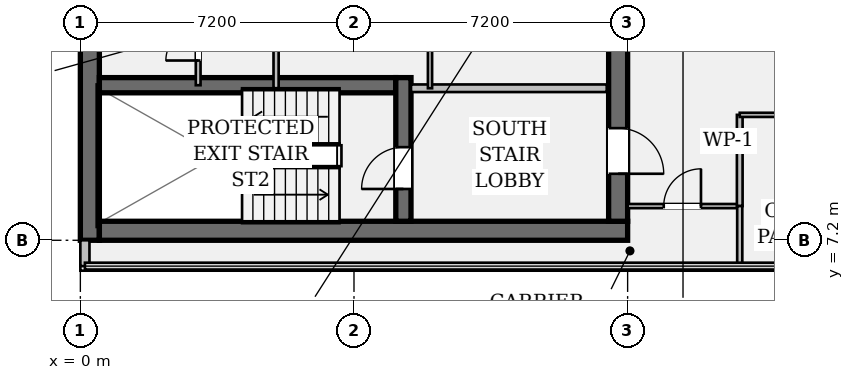
"""IFC4 building model, lengths in metres.
Left out: names, types, materials, properties, quantities, classifications, styles, units other than length and angle.
Written with IfcOpenShell. Run it as: python <this file> out.ifc"""

import sys

from ifc_helpers import new_model, si_unit, direction, frame, frame_2d, origin, place, context, subcontext, project, spatial, rectangle, extrude, element, fill, save


model = new_model("IFC4")
c1 = context("Model", 3, precision=1e-05, world=origin(), true_north=direction((0.0, 1.0)))
c2 = subcontext(c1, "Body", "Model", "MODEL_VIEW")
j1 = project(units=[si_unit("LENGTHUNIT", "METRE"), si_unit("PLANEANGLEUNIT", "RADIAN")], contexts=[c1])
p1 = place(None, origin())
s1 = spatial("IfcSite", under=j1, at=p1, CompositionType="ELEMENT")
p2 = place(p1, origin())
s2 = spatial("IfcBuilding", under=s1, at=p2, CompositionType="ELEMENT")
p3 = place(p2, frame((0.0, 0.0, 290.15)))
s3 = spatial("IfcBuildingStorey", under=s2, at=p3, CompositionType="ELEMENT", Elevation=290.15)
p4 = place(p3, frame((0.25, 7.2, 0.0), z_axis=(0.0, 0.0, 1.0), x_axis=(0.0, 1.0, 0.0)))
e1 = element("IfcWall", 1, at=p4, inside=s3, PredefinedType="SHEAR", context=c2, shape_type="SweptSolid", body=[
    extrude(rectangle(XDim=28.8, YDim=0.5, at=frame_2d((14.4, 0.0))), origin(), (0.0, 0.0, 1.0), 3.24),
])
p5 = place(p3, frame((0.5, 7.45, 0.0), z_axis=(0.0, 0.0, 1.0), x_axis=(1.0, 0.0, 0.0)))
e2 = element("IfcWall", 2, at=p5, inside=s3, PredefinedType="SHEAR", context=c2, shape_type="SweptSolid", body=[
    extrude(rectangle(XDim=13.9, YDim=0.5, at=frame_2d((6.95, 0.0))), origin(), (0.0, 0.0, 1.0), 3.24),
])
p6 = place(p3, frame((14.15, 35.5, 0.0), z_axis=(0.0, 0.0, 1.0), x_axis=(0.0, -1.0, 0.0)))
e3 = element("IfcWall", 3, at=p6, inside=s3, PredefinedType="SHEAR", context=c2, shape_type="SweptSolid", body=[
    extrude(rectangle(XDim=27.8, YDim=0.5, at=frame_2d((13.9, 0.0))), origin(), (0.0, 0.0, 1.0), 3.24),
])
p7 = place(p6, frame((1.4, 0.0, 0.0)))
e4 = element("IfcOpeningElement", 4, at=p7, cuts=e3, PredefinedType="OPENING", context=c2, shape_type="SweptSolid", body=[
    extrude(rectangle(XDim=1.2, YDim=2.15, at=frame_2d((0.6, 1.075))), frame((0.0, 0.262, 0.0), z_axis=(0.0, -1.0, 0.0), x_axis=(1.0, 0.0, 0.0)), (0.0, 0.0, 1.0), 0.524),
])
p8 = place(p6, frame((25.35, 0.0, 0.0)))
e5 = element("IfcOpeningElement", 5, at=p8, cuts=e3, PredefinedType="OPENING", context=c2, shape_type="SweptSolid", body=[
    extrude(rectangle(XDim=1.2, YDim=2.15, at=frame_2d((0.6, 1.075))), frame((0.0, 0.262, 0.0), z_axis=(0.0, -1.0, 0.0), x_axis=(1.0, 0.0, 0.0)), (0.0, 0.0, 1.0), 0.524),
])
p9 = place(p6, frame((14.7, 0.0, 0.0)))
e6 = element("IfcOpeningElement", 6, at=p9, cuts=e3, PredefinedType="OPENING", context=c2, shape_type="SweptSolid", body=[
    extrude(rectangle(XDim=1.6, YDim=2.2, at=frame_2d((0.8, 1.1))), frame((0.0, 0.262, 0.0), z_axis=(0.0, -1.0, 0.0), x_axis=(1.0, 0.0, 0.0)), (0.0, 0.0, 1.0), 0.524),
])
p10 = place(p3, frame((0.5, 11.28, 0.0), z_axis=(0.0, 0.0, 1.0), x_axis=(1.0, 0.0, 0.0)))
e7 = element("IfcWall", 7, at=p10, inside=s3, PredefinedType="SHEAR", context=c2, shape_type="SweptSolid", body=[
    extrude(rectangle(XDim=7.8, YDim=0.4, at=frame_2d((3.9, 0.0))), origin(), (0.0, 0.0, 1.0), 3.24),
])
p11 = place(p3, frame((8.5, 7.7, 0.0), z_axis=(0.0, 0.0, 1.0), x_axis=(0.0, 1.0, 0.0)))
e8 = element("IfcWall", 8, at=p11, inside=s3, PredefinedType="SHEAR", context=c2, shape_type="SweptSolid", body=[
    extrude(rectangle(XDim=3.78, YDim=0.4, at=frame_2d((1.89, 0.0))), origin(), (0.0, 0.0, 1.0), 3.24),
])
p12 = place(p11, frame((0.85, 0.0, 0.0)))
e9 = element("IfcOpeningElement", 9, at=p12, cuts=e8, PredefinedType="OPENING", context=c2, shape_type="SweptSolid", body=[
    extrude(rectangle(XDim=1.1, YDim=2.15, at=frame_2d((0.55, 1.075))), frame((0.0, 0.212, 0.0), z_axis=(0.0, -1.0, 0.0), x_axis=(1.0, 0.0, 0.0)), (0.0, 0.0, 1.0), 0.424),
])
p13 = place(p3, frame((0.12, 6.52, 0.0), z_axis=(0.0, 0.0, 1.0), x_axis=(0.0, 1.0, 0.0)))
e10 = element("IfcWall", 10, at=p13, inside=s3, PredefinedType="STANDARD", context=c2, shape_type="SweptSolid", body=[
    extrude(rectangle(XDim=0.68, YDim=0.24, at=frame_2d((0.34, 0.0))), origin(), (0.0, 0.0, 1.0), 3.24),
])
p14 = place(p3, frame((8.7, 11.2, 0.0), z_axis=(0.0, 0.0, 1.0), x_axis=(1.0, 0.0, 0.0)))
e11 = element("IfcWall", 11, at=p14, inside=s3, PredefinedType="PARTITIONING", context=c2, shape_type="SweptSolid", body=[
    extrude(rectangle(XDim=5.15, YDim=0.2, at=frame_2d((2.575, 0.0))), origin(), (0.0, 0.0, 1.0), 3.24),
])
p15 = place(p3, frame((5.15, 11.2, 0.0), z_axis=(0.0, 0.0, 1.0), x_axis=(0.0, 1.0, 0.0)))
e12 = element("IfcWall", 12, at=p15, inside=s3, PredefinedType="PARTITIONING", context=c2, shape_type="SweptSolid", body=[
    extrude(rectangle(XDim=6.6, YDim=0.135, at=frame_2d((3.3, 0.0))), origin(), (0.0, 0.0, 1.0), 3.24),
])
p16 = place(p3, frame((9.2, 11.2, 0.0), z_axis=(0.0, 0.0, 1.0), x_axis=(0.0, 1.0, 0.0)))
e13 = element("IfcWall", 13, at=p16, inside=s3, PredefinedType="PARTITIONING", context=c2, shape_type="SweptSolid", body=[
    extrude(rectangle(XDim=6.6, YDim=0.11, at=frame_2d((3.3, 0.0))), origin(), (0.0, 0.0, 1.0), 3.24),
])
p17 = place(p3, frame((3.1, 11.28, 0.0), z_axis=(0.0, 0.0, 1.0), x_axis=(0.0, 1.0, 0.0)))
e14 = element("IfcWall", 14, at=p17, inside=s3, PredefinedType="PARTITIONING", context=c2, shape_type="SweptSolid", body=[
    extrude(rectangle(XDim=4.42, YDim=0.125, at=frame_2d((2.21, 0.0))), origin(), (0.0, 0.0, 1.0), 3.24),
])
p18 = place(p17, frame((0.65, 0.0, 0.0)))
e15 = element("IfcOpeningElement", 15, at=p18, cuts=e14, PredefinedType="OPENING", context=c2, shape_type="SweptSolid", body=[
    extrude(rectangle(XDim=0.85, YDim=2.15, at=frame_2d((0.425, 1.075))), frame((0.0, 0.074, 0.0), z_axis=(0.0, -1.0, 0.0), x_axis=(1.0, 0.0, 0.0)), (0.0, 0.0, 1.0), 0.149),
])
p19 = place(p17, frame((2.75, 0.0, 0.0)))
e16 = element("IfcOpeningElement", 16, at=p19, cuts=e14, PredefinedType="OPENING", context=c2, shape_type="SweptSolid", body=[
    extrude(rectangle(XDim=0.85, YDim=2.15, at=frame_2d((0.425, 1.075))), frame((0.0, 0.074, 0.0), z_axis=(0.0, -1.0, 0.0), x_axis=(1.0, 0.0, 0.0)), (0.0, 0.0, 1.0), 0.149),
])
p20 = place(p3, frame((14.4, 8.1, 0.0), z_axis=(0.0, 0.0, 1.0), x_axis=(1.0, 0.0, 0.0)))
e17 = element("IfcWall", 17, at=p20, inside=s3, PredefinedType="PARTITIONING", context=c2, shape_type="SweptSolid", body=[
    extrude(rectangle(XDim=2.95, YDim=0.11, at=frame_2d((1.475, 0.0))), origin(), (0.0, 0.0, 1.0), 3.24),
])
p21 = place(p20, frame((0.95, 0.0, 0.0)))
e18 = element("IfcOpeningElement", 18, at=p21, cuts=e17, PredefinedType="OPENING", context=c2, shape_type="SweptSolid", body=[
    extrude(rectangle(XDim=0.98, YDim=2.15, at=frame_2d((0.49, 1.075))), frame((0.0, 0.067, 0.0), z_axis=(0.0, -1.0, 0.0), x_axis=(1.0, 0.0, 0.0)), (0.0, 0.0, 1.0), 0.134),
])
p22 = place(p3, frame((17.35, 8.1, 0.0), z_axis=(0.0, 0.0, 1.0), x_axis=(0.0, 1.0, 0.0)))
e19 = element("IfcWall", 19, at=p22, inside=s3, PredefinedType="PARTITIONING", context=c2, shape_type="SweptSolid", body=[
    extrude(rectangle(XDim=2.4, YDim=0.15, at=frame_2d((1.2, 0.0))), origin(), (0.0, 0.0, 1.0), 3.24),
])
p23 = place(p3, frame((17.35, 10.5, 0.0), z_axis=(0.0, 0.0, 1.0), x_axis=(1.0, 0.0, 0.0)))
e20 = element("IfcWall", 20, at=p23, inside=s3, PredefinedType="PARTITIONING", context=c2, shape_type="SweptSolid", body=[
    extrude(rectangle(XDim=12.6, YDim=0.11, at=frame_2d((6.3, 0.0))), origin(), (0.0, 0.0, 1.0), 2.676),
])
p24 = place(p23, frame((1.92, 0.0, 0.0)))
e21 = element("IfcOpeningElement", 21, at=p24, cuts=e20, PredefinedType="OPENING", context=c2, shape_type="SweptSolid", body=[
    extrude(rectangle(XDim=0.98, YDim=2.15, at=frame_2d((0.49, 1.075))), frame((0.0, 0.067, 0.0), z_axis=(0.0, -1.0, 0.0), x_axis=(1.0, 0.0, 0.0)), (0.0, 0.0, 1.0), 0.134),
])
p25 = place(p23, frame((6.55, 0.0, 0.0)))
e22 = element("IfcOpeningElement", 22, at=p25, cuts=e20, PredefinedType="OPENING", context=c2, shape_type="SweptSolid", body=[
    extrude(rectangle(XDim=0.98, YDim=2.15, at=frame_2d((0.49, 1.075))), frame((0.0, 0.067, 0.0), z_axis=(0.0, -1.0, 0.0), x_axis=(1.0, 0.0, 0.0)), (0.0, 0.0, 1.0), 0.134),
])
p26 = place(p23, frame((10.42, 0.0, 0.0)))
e23 = element("IfcOpeningElement", 23, at=p26, cuts=e20, PredefinedType="OPENING", context=c2, shape_type="SweptSolid", body=[
    extrude(rectangle(XDim=0.98, YDim=2.15, at=frame_2d((0.49, 1.075))), frame((0.0, 0.067, 0.0), z_axis=(0.0, -1.0, 0.0), x_axis=(1.0, 0.0, 0.0)), (0.0, 0.0, 1.0), 0.134),
])
p27 = place(p3, frame((17.35, 6.52, 0.0), z_axis=(0.0, 0.0, 1.0), x_axis=(0.0, 1.0, 0.0)))
e24 = element("IfcWall", 24, at=p27, inside=s3, PredefinedType="PARTITIONING", context=c2, shape_type="SweptSolid", body=[
    extrude(rectangle(XDim=1.58, YDim=0.135, at=frame_2d((0.79, 0.0))), origin(), (0.0, 0.0, 1.0), 3.24),
])
p28 = place(p12, origin())
e25 = element("IfcDoor", 25, at=p28, inside=s3, OperationType="SINGLE_SWING_LEFT", PredefinedType="DOOR", context=c2, shape_type="SweptSolid", body=[
    extrude(rectangle(XDim=1.1, YDim=2.15, at=frame_2d((0.55, 1.075))), frame((0.0, 0.025, 0.0), z_axis=(0.0, -1.0, 0.0), x_axis=(1.0, 0.0, 0.0)), (0.0, 0.0, 1.0), 0.05),
])
fill(e9, e25)
p29 = place(p8, origin())
e26 = element("IfcDoor", 26, at=p29, inside=s3, OperationType="SINGLE_SWING_RIGHT", PredefinedType="DOOR", context=c2, shape_type="SweptSolid", body=[
    extrude(rectangle(XDim=1.2, YDim=2.15, at=frame_2d((0.6, 1.075))), frame((0.0, 0.025, 0.0), z_axis=(0.0, -1.0, 0.0), x_axis=(1.0, 0.0, 0.0)), (0.0, 0.0, 1.0), 0.05),
])
fill(e5, e26)
p30 = place(p18, origin())
e27 = element("IfcDoor", 27, at=p30, inside=s3, OperationType="SINGLE_SWING_LEFT", PredefinedType="DOOR", context=c2, shape_type="SweptSolid", body=[
    extrude(rectangle(XDim=0.85, YDim=2.15, at=frame_2d((0.425, 1.075))), frame((0.0, 0.025, 0.0), z_axis=(0.0, -1.0, 0.0), x_axis=(1.0, 0.0, 0.0)), (0.0, 0.0, 1.0), 0.05),
])
fill(e15, e27)
p31 = place(p21, origin())
e28 = element("IfcDoor", 28, at=p31, inside=s3, OperationType="SINGLE_SWING_RIGHT", PredefinedType="DOOR", context=c2, shape_type="SweptSolid", body=[
    extrude(rectangle(XDim=0.98, YDim=2.15, at=frame_2d((0.49, 1.075))), frame((0.0, 0.025, 0.0), z_axis=(0.0, -1.0, 0.0), x_axis=(1.0, 0.0, 0.0)), (0.0, 0.0, 1.0), 0.05),
])
fill(e18, e28)
save(model, sys.argv[1])
